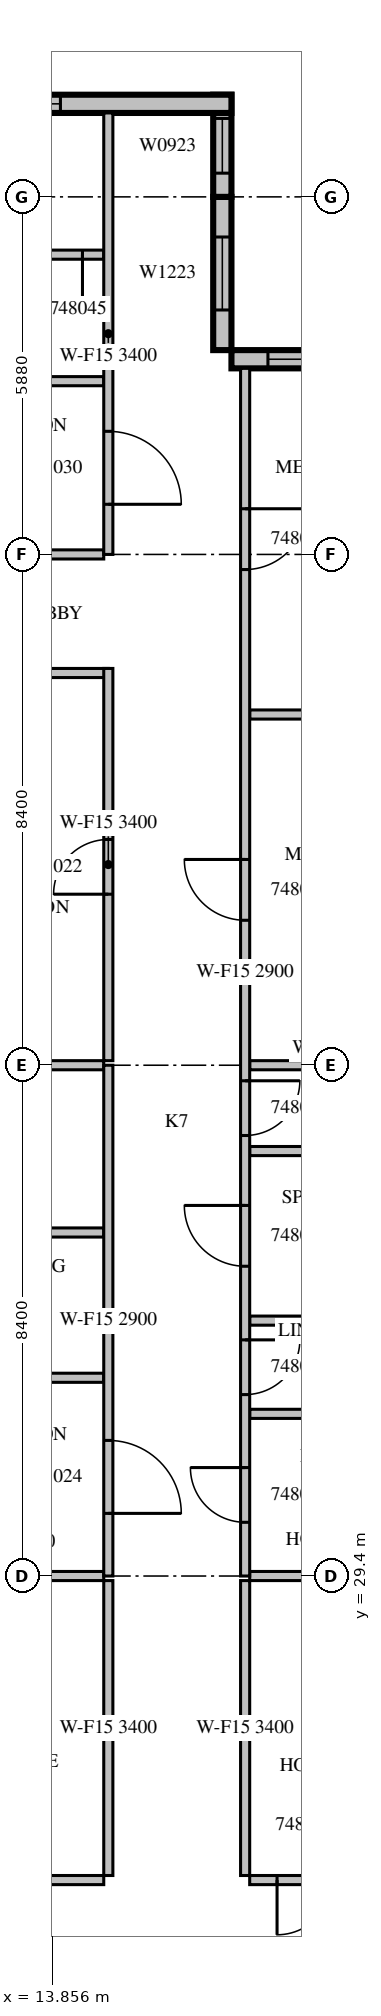
"""IFC4 building model, lengths in metres.
Left out: names, types, materials, properties, quantities, classifications, styles, units other than length and angle.
Written with IfcOpenShell. Run it as: python <this file> out.ifc"""

import sys

from ifc_helpers import new_model, si_unit, direction, frame, frame_2d, origin, place, context, subcontext, project, spatial, rectangle, extrude, source, transform, mapped, element, fill, save


model = new_model("IFC4")
c1 = context("Model", 3, precision=1e-05, world=origin(), true_north=direction((0.0, 1.0)))
c2 = subcontext(c1, "Body", "Model", "MODEL_VIEW")
j1 = project(units=[si_unit("LENGTHUNIT", "METRE"), si_unit("PLANEANGLEUNIT", "RADIAN")], contexts=[c1])
p1 = place(None, origin())
s1 = spatial("IfcSite", under=j1, at=p1, CompositionType="ELEMENT")
p2 = place(p1, origin())
s2 = spatial("IfcBuilding", under=s1, at=p2, CompositionType="ELEMENT")
p3 = place(p2, frame((0.0, 0.0, 215.8)))
s3 = spatial("IfcBuildingStorey", under=s2, at=p3, CompositionType="ELEMENT", Elevation=215.8)
m1 = source(origin(), c2, "Body", "SweptSolid", [
    extrude(rectangle(XDim=4.2, YDim=0.3, at=frame_2d((2.1, 0.0))), origin(), (0.0, 0.0, 1.0), 3.4),
])
p4 = place(p3, frame((21.0, 49.41, 0.0), z_axis=(0.0, 0.0, 1.0), x_axis=(-1.0, 0.0, 0.0)))
e1 = element("IfcWall", 1, at=p4, inside=s3, PredefinedType="STANDARD", context=c2, shape_type="MappedRepresentation", body=[
    mapped(m1, transform((0.0, 0.0, 0.0), scale=1.0)),
])
m2 = source(origin(), c2, "Body", "SweptSolid", [
    extrude(rectangle(XDim=3.0, YDim=2.3, at=frame_2d((1.5, 1.15))), frame((0.0, 0.16, 0.0), z_axis=(0.0, -1.0, 0.0), x_axis=(1.0, 0.0, 0.0)), (0.0, 0.0, 1.0), 0.32),
])
p5 = place(p4, frame((0.6, 0.0, 0.6)))
e2 = element("IfcOpeningElement", 2, at=p5, cuts=e1, PredefinedType="OPENING", context=c2, shape_type="MappedRepresentation", body=[
    mapped(m2, transform((0.0, 0.0, 0.0), scale=1.0)),
])
m3 = source(origin(), c2, "Body", "SweptSolid", [
    extrude(rectangle(XDim=2.52, YDim=0.3, at=frame_2d((1.26, 0.0))), origin(), (0.0, 0.0, 1.0), 3.4),
])
p6 = place(p3, frame((16.65, 49.56, 0.0), z_axis=(0.0, 0.0, 1.0), x_axis=(0.0, 1.0, 0.0)))
e3 = element("IfcWall", 3, at=p6, inside=s3, PredefinedType="STANDARD", context=c2, shape_type="MappedRepresentation", body=[
    mapped(m3, transform((0.0, 0.0, 0.0), scale=1.0)),
])
m4 = source(origin(), c2, "Body", "SweptSolid", [
    extrude(rectangle(XDim=1.2, YDim=2.3, at=frame_2d((0.6, 1.15))), frame((0.0, 0.16, 0.0), z_axis=(0.0, -1.0, 0.0), x_axis=(1.0, 0.0, 0.0)), (0.0, 0.0, 1.0), 0.32),
])
p7 = place(p6, frame((0.66, 0.0, 0.6)))
e4 = element("IfcOpeningElement", 4, at=p7, cuts=e3, PredefinedType="OPENING", context=c2, shape_type="MappedRepresentation", body=[
    mapped(m4, transform((0.0, 0.0, 0.0), scale=1.0)),
])
m5 = source(origin(), c2, "Body", "SweptSolid", [
    extrude(rectangle(XDim=1.68, YDim=0.3, at=frame_2d((0.84, 0.0))), origin(), (0.0, 0.0, 1.0), 3.4),
])
p8 = place(p3, frame((16.65, 52.08, 0.0), z_axis=(0.0, 0.0, 1.0), x_axis=(0.0, 1.0, 0.0)))
e5 = element("IfcWall", 5, at=p8, inside=s3, PredefinedType="STANDARD", context=c2, shape_type="MappedRepresentation", body=[
    mapped(m5, transform((0.0, 0.0, 0.0), scale=1.0)),
])
m6 = source(origin(), c2, "Body", "SweptSolid", [
    extrude(rectangle(XDim=0.9, YDim=2.3, at=frame_2d((0.45, 1.15))), frame((0.0, 0.16, 0.0), z_axis=(0.0, -1.0, 0.0), x_axis=(1.0, 0.0, 0.0)), (0.0, 0.0, 1.0), 0.32),
])
p9 = place(p8, frame((0.39, 0.0, 0.6)))
e6 = element("IfcOpeningElement", 6, at=p9, cuts=e5, PredefinedType="OPENING", context=c2, shape_type="MappedRepresentation", body=[
    mapped(m6, transform((0.0, 0.0, 0.0), scale=1.0)),
])
m7 = source(origin(), c2, "Body", "SweptSolid", [
    extrude(rectangle(XDim=10.5, YDim=0.3, at=frame_2d((5.25, 0.0))), origin(), (0.0, 0.0, 1.0), 3.4),
])
p10 = place(p3, frame((16.8, 53.61, 0.0), z_axis=(0.0, 0.0, 1.0), x_axis=(-1.0, 0.0, 0.0)))
e7 = element("IfcWall", 7, at=p10, inside=s3, PredefinedType="STANDARD", context=c2, shape_type="MappedRepresentation", body=[
    mapped(m7, transform((0.0, 0.0, 0.0), scale=1.0)),
])
m8 = source(origin(), c2, "Body", "SweptSolid", [
    extrude(rectangle(XDim=1.8, YDim=2.3, at=frame_2d((0.9, 1.15))), frame((0.0, 0.16, 0.0), z_axis=(0.0, -1.0, 0.0), x_axis=(1.0, 0.0, 0.0)), (0.0, 0.0, 1.0), 0.32),
])
p11 = place(p10, frame((8.025, 0.0, 0.6)))
e8 = element("IfcOpeningElement", 8, at=p11, cuts=e7, PredefinedType="OPENING", context=c2, shape_type="MappedRepresentation", body=[
    mapped(m8, transform((0.0, 0.0, 0.0), scale=1.0)),
])
m9 = source(origin(), c2, "Body", "SweptSolid", [
    extrude(rectangle(XDim=2.4, YDim=2.3, at=frame_2d((1.2, 1.15))), frame((0.0, 0.16, 0.0), z_axis=(0.0, -1.0, 0.0), x_axis=(1.0, 0.0, 0.0)), (0.0, 0.0, 1.0), 0.32),
])
p12 = place(p10, frame((2.812, 0.0, 0.6)))
e9 = element("IfcOpeningElement", 9, at=p12, cuts=e7, PredefinedType="OPENING", context=c2, shape_type="MappedRepresentation", body=[
    mapped(m9, transform((0.0, 0.0, 0.0), scale=1.0)),
])
m10 = source(origin(), c2, "Body", "SweptSolid", [
    extrude(rectangle(XDim=8.195, YDim=0.15, at=frame_2d((4.098, 0.0))), origin(), (0.0, 0.0, 1.0), 3.4),
])
p13 = place(p3, frame((6.505, 24.4, 0.0), z_axis=(0.0, 0.0, 1.0), x_axis=(1.0, 0.0, 0.0)))
e10 = element("IfcWall", 10, at=p13, inside=s3, PredefinedType="PARTITIONING", context=c2, shape_type="MappedRepresentation", body=[
    mapped(m10, transform((0.0, 0.0, 0.0), scale=1.0)),
])
m11 = source(origin(), c2, "Body", "SweptSolid", [
    extrude(rectangle(XDim=0.9, YDim=2.1, at=frame_2d((0.45, 1.05))), frame((0.0, 0.085, 0.0), z_axis=(0.0, -1.0, 0.0), x_axis=(1.0, 0.0, 0.0)), (0.0, 0.0, 1.0), 0.17),
])
p14 = place(p13, frame((1.395, 0.0, 0.0)))
e11 = element("IfcOpeningElement", 11, at=p14, cuts=e10, PredefinedType="OPENING", context=c2, shape_type="MappedRepresentation", body=[
    mapped(m11, transform((0.0, 0.0, 0.0), scale=1.0)),
])
p15 = place(p13, frame((6.32, 0.0, 0.0)))
e12 = element("IfcOpeningElement", 12, at=p15, cuts=e10, PredefinedType="OPENING", context=c2, shape_type="MappedRepresentation", body=[
    mapped(m11, transform((0.0, 0.0, 0.0), scale=1.0)),
])
m12 = source(origin(), c2, "Body", "SweptSolid", [
    extrude(rectangle(XDim=3.6, YDim=0.15, at=frame_2d((1.8, 0.0))), origin(), (0.0, 0.0, 1.0), 3.4),
])
p16 = place(p3, frame((17.1, 24.4, 0.0), z_axis=(0.0, 0.0, 1.0), x_axis=(1.0, 0.0, 0.0)))
e13 = element("IfcWall", 13, at=p16, inside=s3, PredefinedType="PARTITIONING", context=c2, shape_type="MappedRepresentation", body=[
    mapped(m12, transform((0.0, 0.0, 0.0), scale=1.0)),
])
p17 = place(p16, frame((0.45, 0.0, 0.0)))
e14 = element("IfcOpeningElement", 14, at=p17, cuts=e13, PredefinedType="OPENING", context=c2, shape_type="MappedRepresentation", body=[
    mapped(m11, transform((0.0, 0.0, 0.0), scale=1.0)),
])
m13 = source(origin(), c2, "Body", "SweptSolid", [
    extrude(rectangle(XDim=4.85, YDim=0.15, at=frame_2d((2.425, 0.0))), origin(), (0.0, 0.0, 1.0), 3.4),
])
for number, where, z_axis, x_axis in (
    (15, (14.775, 24.475, 0.0), (0.0, 0.0, 1.0), (0.0, 1.0, 0.0)),
    (16, (17.025, 29.325, 0.0), (0.0, 0.0, 1.0), (0.0, -1.0, 0.0)),
):
    element("IfcWall", number, at=place(p3, frame(where, z_axis=z_axis, x_axis=x_axis)), inside=s3, PredefinedType="PARTITIONING", context=c2, shape_type="MappedRepresentation", body=[
        mapped(m13, transform((0.0, 0.0, 0.0), scale=1.0)),
    ])
m14 = source(origin(), c2, "Body", "SweptSolid", [
    extrude(rectangle(XDim=3.751, YDim=0.15, at=frame_2d((1.875, 0.0))), origin(), (0.0, 0.0, 1.0), 3.4),
])
p18 = place(p3, frame((14.7, 29.4, 0.0), z_axis=(0.0, 0.0, 1.0), x_axis=(-1.0, 0.0, 0.0)))
e17 = element("IfcWall", 17, at=p18, inside=s3, PredefinedType="PARTITIONING", context=c2, shape_type="MappedRepresentation", body=[
    mapped(m14, transform((0.0, 0.0, 0.0), scale=1.0)),
])
m15 = source(origin(), c2, "Body", "SweptSolid", [
    extrude(rectangle(XDim=3.001, YDim=0.15, at=frame_2d((1.5, 0.0))), origin(), (0.0, 0.0, 1.0), 3.4),
])
p19 = place(p3, frame((20.101, 29.4, 0.0), z_axis=(0.0, 0.0, 1.0), x_axis=(-1.0, 0.0, 0.0)))
e18 = element("IfcWall", 18, at=p19, inside=s3, PredefinedType="PARTITIONING", context=c2, shape_type="MappedRepresentation", body=[
    mapped(m15, transform((0.0, 0.0, 0.0), scale=1.0)),
])
m16 = source(origin(), c2, "Body", "SweptSolid", [
    extrude(rectangle(XDim=2.875, YDim=0.15, at=frame_2d((1.438, 0.0))), origin(), (0.0, 0.0, 1.0), 3.4),
])
p20 = place(p3, frame((14.775, 44.25, 0.0), z_axis=(0.0, 0.0, 1.0), x_axis=(-1.0, 0.0, 0.0)))
e19 = element("IfcWall", 19, at=p20, inside=s3, PredefinedType="PARTITIONING", context=c2, shape_type="MappedRepresentation", body=[
    mapped(m16, transform((0.0, 0.0, 0.0), scale=1.0)),
])
m17 = source(origin(), c2, "Body", "SweptSolid", [
    extrude(rectangle(XDim=6.45, YDim=0.15, at=frame_2d((3.225, 0.0))), origin(), (0.0, 0.0, 1.0), 3.4),
])
p21 = place(p3, frame((14.775, 37.875, 0.0), z_axis=(0.0, 0.0, 1.0), x_axis=(0.0, 1.0, 0.0)))
e20 = element("IfcWall", 20, at=p21, inside=s3, PredefinedType="PARTITIONING", context=c2, shape_type="MappedRepresentation", body=[
    mapped(m17, transform((0.0, 0.0, 0.0), scale=1.0)),
])
p22 = place(p21, frame((2.737, 0.0, 0.0)))
e21 = element("IfcOpeningElement", 21, at=p22, cuts=e20, PredefinedType="OPENING", context=c2, shape_type="MappedRepresentation", body=[
    mapped(m11, transform((0.0, 0.0, 0.0), scale=1.0)),
])
for number, where, z_axis, x_axis in (
    (22, (14.7, 32.66, 0.0), (0.0, 0.0, 1.0), (-1.0, 0.0, 0.0)),
    (23, (14.7, 35.049, 0.0), (0.0, 0.0, 1.0), (-1.0, 0.0, 0.0)),
    (24, (14.7, 37.8, 0.0), (0.0, 0.0, 1.0), (-1.0, 0.0, 0.0)),
    (25, (14.7, 49.049, 0.0), (0.0, 0.0, 1.0), (-1.0, 0.0, 0.0)),
):
    element("IfcWall", number, at=place(p3, frame(where, z_axis=z_axis, x_axis=x_axis)), inside=s3, PredefinedType="PARTITIONING", context=c2, shape_type="MappedRepresentation", body=[
        mapped(m12, transform((0.0, 0.0, 0.0), scale=1.0)),
    ])
p23 = place(p3, frame((14.7, 51.13, 0.0), z_axis=(0.0, 0.0, 1.0), x_axis=(-1.0, 0.0, 0.0)))
e26 = element("IfcWall", 26, at=p23, inside=s3, PredefinedType="PARTITIONING", context=c2, shape_type="MappedRepresentation", body=[
    mapped(m12, transform((0.0, 0.0, 0.0), scale=1.0)),
])
p24 = place(p23, frame((1.35, 0.0, 0.0)))
e27 = element("IfcOpeningElement", 27, at=p24, cuts=e26, PredefinedType="OPENING", context=c2, shape_type="MappedRepresentation", body=[
    mapped(m11, transform((0.0, 0.0, 0.0), scale=1.0)),
])
p25 = place(p23, frame((0.35, 0.0, 0.0)))
e28 = element("IfcOpeningElement", 28, at=p25, cuts=e26, PredefinedType="OPENING", context=c2, shape_type="MappedRepresentation", body=[
    mapped(m11, transform((0.0, 0.0, 0.0), scale=1.0)),
])
p26 = place(p23, frame((2.35, 0.0, 0.0)))
e29 = element("IfcOpeningElement", 29, at=p26, cuts=e26, PredefinedType="OPENING", context=c2, shape_type="MappedRepresentation", body=[
    mapped(m11, transform((0.0, 0.0, 0.0), scale=1.0)),
])
p27 = place(p3, frame((14.7, 46.2, 0.0), z_axis=(0.0, 0.0, 1.0), x_axis=(-1.0, 0.0, 0.0)))
e30 = element("IfcWall", 30, at=p27, inside=s3, PredefinedType="PARTITIONING", context=c2, shape_type="MappedRepresentation", body=[
    mapped(m12, transform((0.0, 0.0, 0.0), scale=1.0)),
])
m18 = source(origin(), c2, "Body", "SweptSolid", [
    extrude(rectangle(XDim=3.6, YDim=0.15, at=frame_2d((1.8, 0.0))), origin(), (0.0, 0.0, 1.0), 2.4),
])
for number, where, z_axis, x_axis in (
    (31, (17.1, 32.067, 0.0), (0.0, 0.0, 1.0), (1.0, 0.0, 0.0)),
    (32, (17.1, 36.389, 0.0), (0.0, 0.0, 1.0), (1.0, 0.0, 0.0)),
):
    element("IfcWall", number, at=place(p3, frame(where, z_axis=z_axis, x_axis=x_axis)), inside=s3, PredefinedType="PARTITIONING", context=c2, shape_type="MappedRepresentation", body=[
        mapped(m18, transform((0.0, 0.0, 0.0), scale=1.0)),
    ])
p28 = place(p3, frame((17.1, 43.568, 0.0), z_axis=(0.0, 0.0, 1.0), x_axis=(1.0, 0.0, 0.0)))
e33 = element("IfcWall", 33, at=p28, inside=s3, PredefinedType="PARTITIONING", context=c2, shape_type="MappedRepresentation", body=[
    mapped(m12, transform((0.0, 0.0, 0.0), scale=1.0)),
])
p29 = place(p3, frame((20.7, 33.6, 0.0), z_axis=(0.0, 0.0, 1.0), x_axis=(-1.0, 0.0, 0.0)))
e34 = element("IfcWall", 34, at=p29, inside=s3, PredefinedType="PARTITIONING", context=c2, shape_type="MappedRepresentation", body=[
    mapped(m18, transform((0.0, 0.0, 0.0), scale=1.0)),
])
p30 = place(p3, frame((20.101, 37.8, 0.0), z_axis=(0.0, 0.0, 1.0), x_axis=(-1.0, 0.0, 0.0)))
e35 = element("IfcWall", 35, at=p30, inside=s3, PredefinedType="PARTITIONING", context=c2, shape_type="MappedRepresentation", body=[
    mapped(m15, transform((0.0, 0.0, 0.0), scale=1.0)),
])
m19 = source(origin(), c2, "Body", "SweptSolid", [
    extrude(rectangle(XDim=8.4, YDim=0.15, at=frame_2d((4.2, 0.0))), origin(), (0.0, 0.0, 1.0), 2.9),
])
p31 = place(p3, frame((14.775, 29.4, 0.0), z_axis=(0.0, 0.0, 1.0), x_axis=(0.0, 1.0, 0.0)))
e36 = element("IfcWall", 36, at=p31, inside=s3, PredefinedType="PARTITIONING", context=c2, shape_type="MappedRepresentation", body=[
    mapped(m19, transform((0.0, 0.0, 0.0), scale=1.0)),
])
m20 = source(origin(), c2, "Body", "SweptSolid", [
    extrude(rectangle(XDim=1.2, YDim=2.1, at=frame_2d((0.6, 1.05))), frame((0.0, 0.085, 0.0), z_axis=(0.0, -1.0, 0.0), x_axis=(1.0, 0.0, 0.0)), (0.0, 0.0, 1.0), 0.17),
])
p32 = place(p31, frame((1.03, 0.0, 0.0)))
e37 = element("IfcOpeningElement", 37, at=p32, cuts=e36, PredefinedType="OPENING", context=c2, shape_type="MappedRepresentation", body=[
    mapped(m20, transform((0.0, 0.0, 0.0), scale=1.0)),
])
m21 = source(origin(), c2, "Body", "SweptSolid", [
    extrude(rectangle(XDim=7.26, YDim=0.15, at=frame_2d((3.63, 0.0))), origin(), (0.0, 0.0, 1.0), 3.4),
])
p33 = place(p3, frame((14.775, 46.2, 0.0), z_axis=(0.0, 0.0, 1.0), x_axis=(0.0, 1.0, 0.0)))
e38 = element("IfcWall", 38, at=p33, inside=s3, PredefinedType="PARTITIONING", context=c2, shape_type="MappedRepresentation", body=[
    mapped(m21, transform((0.0, 0.0, 0.0), scale=1.0)),
])
p34 = place(p33, frame((0.825, 0.0, 0.0)))
e39 = element("IfcOpeningElement", 39, at=p34, cuts=e38, PredefinedType="OPENING", context=c2, shape_type="MappedRepresentation", body=[
    mapped(m20, transform((0.0, 0.0, 0.0), scale=1.0)),
])
m22 = source(origin(), c2, "Body", "SweptSolid", [
    extrude(rectangle(XDim=19.86, YDim=0.15, at=frame_2d((9.93, 0.0))), origin(), (0.0, 0.0, 1.0), 2.9),
])
p35 = place(p3, frame((17.025, 49.26, 0.0), z_axis=(0.0, 0.0, 1.0), x_axis=(0.0, -1.0, 0.0)))
e40 = element("IfcWall", 40, at=p35, inside=s3, PredefinedType="PARTITIONING", context=c2, shape_type="MappedRepresentation", body=[
    mapped(m22, transform((0.0, 0.0, 0.0), scale=1.0)),
])
p36 = place(p35, frame((18.076, 0.0, 0.0)))
e41 = element("IfcOpeningElement", 41, at=p36, cuts=e40, PredefinedType="OPENING", context=c2, shape_type="MappedRepresentation", body=[
    mapped(m11, transform((0.0, 0.0, 0.0), scale=1.0)),
])
p37 = place(p35, frame((15.976, 0.0, 0.0)))
e42 = element("IfcOpeningElement", 42, at=p37, cuts=e40, PredefinedType="OPENING", context=c2, shape_type="MappedRepresentation", body=[
    mapped(m11, transform((0.0, 0.0, 0.0), scale=1.0)),
])
m23 = source(origin(), c2, "Body", "SweptSolid", [
    extrude(rectangle(XDim=1.0, YDim=2.1, at=frame_2d((0.5, 1.05))), frame((0.0, 0.085, 0.0), z_axis=(0.0, -1.0, 0.0), x_axis=(1.0, 0.0, 0.0)), (0.0, 0.0, 1.0), 0.17),
])
p38 = place(p35, frame((13.766, 0.0, 0.0)))
e43 = element("IfcOpeningElement", 43, at=p38, cuts=e40, PredefinedType="OPENING", context=c2, shape_type="MappedRepresentation", body=[
    mapped(m23, transform((0.0, 0.0, 0.0), scale=1.0)),
])
p39 = place(p35, frame((11.716, 0.0, 0.0)))
e44 = element("IfcOpeningElement", 44, at=p39, cuts=e40, PredefinedType="OPENING", context=c2, shape_type="MappedRepresentation", body=[
    mapped(m11, transform((0.0, 0.0, 0.0), scale=1.0)),
])
p40 = place(p35, frame((8.076, 0.0, 0.0)))
e45 = element("IfcOpeningElement", 45, at=p40, cuts=e40, PredefinedType="OPENING", context=c2, shape_type="MappedRepresentation", body=[
    mapped(m23, transform((0.0, 0.0, 0.0), scale=1.0)),
])
p41 = place(p35, frame((2.309, 0.0, 0.0)))
e46 = element("IfcOpeningElement", 46, at=p41, cuts=e40, PredefinedType="OPENING", context=c2, shape_type="MappedRepresentation", body=[
    mapped(m23, transform((0.0, 0.0, 0.0), scale=1.0)),
])
m24 = source(origin(), c2, "Body", "SweptSolid", [
    extrude(rectangle(XDim=3.0, YDim=2.3, at=frame_2d((1.5, 1.15))), frame((0.0, 0.03, 0.0), z_axis=(0.0, -1.0, 0.0), x_axis=(1.0, 0.0, 0.0)), (0.0, 0.0, 1.0), 0.06),
])
p42 = place(p5, origin())
e47 = element("IfcWindow", 47, at=p42, inside=s3, PartitioningType="SINGLE_PANEL", PredefinedType="WINDOW", context=c2, shape_type="MappedRepresentation", body=[
    mapped(m24, transform((0.0, 0.0, 0.0), scale=1.0)),
])
fill(e2, e47)
m25 = source(origin(), c2, "Body", "SweptSolid", [
    extrude(rectangle(XDim=1.2, YDim=2.3, at=frame_2d((0.6, 1.15))), frame((0.0, 0.03, 0.0), z_axis=(0.0, -1.0, 0.0), x_axis=(1.0, 0.0, 0.0)), (0.0, 0.0, 1.0), 0.06),
])
p43 = place(p7, origin())
e48 = element("IfcWindow", 48, at=p43, inside=s3, PartitioningType="SINGLE_PANEL", PredefinedType="WINDOW", context=c2, shape_type="MappedRepresentation", body=[
    mapped(m25, transform((0.0, 0.0, 0.0), scale=1.0)),
])
fill(e4, e48)
m26 = source(origin(), c2, "Body", "SweptSolid", [
    extrude(rectangle(XDim=0.9, YDim=2.3, at=frame_2d((0.45, 1.15))), frame((0.0, 0.03, 0.0), z_axis=(0.0, -1.0, 0.0), x_axis=(1.0, 0.0, 0.0)), (0.0, 0.0, 1.0), 0.06),
])
p44 = place(p9, origin())
e49 = element("IfcWindow", 49, at=p44, inside=s3, PartitioningType="SINGLE_PANEL", PredefinedType="WINDOW", context=c2, shape_type="MappedRepresentation", body=[
    mapped(m26, transform((0.0, 0.0, 0.0), scale=1.0)),
])
fill(e6, e49)
m27 = source(origin(), c2, "Body", "SweptSolid", [
    extrude(rectangle(XDim=2.4, YDim=2.3, at=frame_2d((1.2, 1.15))), frame((0.0, 0.03, 0.0), z_axis=(0.0, -1.0, 0.0), x_axis=(1.0, 0.0, 0.0)), (0.0, 0.0, 1.0), 0.06),
])
p45 = place(p12, origin())
e50 = element("IfcWindow", 50, at=p45, inside=s3, PartitioningType="SINGLE_PANEL", PredefinedType="WINDOW", context=c2, shape_type="MappedRepresentation", body=[
    mapped(m27, transform((0.0, 0.0, 0.0), scale=1.0)),
])
fill(e9, e50)
m28 = source(origin(), c2, "Body", "SweptSolid", [
    extrude(rectangle(XDim=0.9, YDim=2.1, at=frame_2d((0.45, 1.05))), frame((0.0, 0.025, 0.0), z_axis=(0.0, -1.0, 0.0), x_axis=(1.0, 0.0, 0.0)), (0.0, 0.0, 1.0), 0.05),
])
p46 = place(p17, origin())
e51 = element("IfcDoor", 51, at=p46, inside=s3, OperationType="SINGLE_SWING_RIGHT", PredefinedType="DOOR", context=c2, shape_type="MappedRepresentation", body=[
    mapped(m28, transform((0.0, 0.0, 0.0), scale=1.0)),
])
fill(e14, e51)
p47 = place(p22, origin())
e52 = element("IfcDoor", 52, at=p47, inside=s3, OperationType="SINGLE_SWING_LEFT", PredefinedType="DOOR", context=c2, shape_type="MappedRepresentation", body=[
    mapped(m28, transform((0.0, 0.0, 0.0), scale=1.0)),
])
fill(e21, e52)
m29 = source(origin(), c2, "Body", "SweptSolid", [
    extrude(rectangle(XDim=1.2, YDim=2.1, at=frame_2d((0.6, 1.05))), frame((0.0, 0.025, 0.0), z_axis=(0.0, -1.0, 0.0), x_axis=(1.0, 0.0, 0.0)), (0.0, 0.0, 1.0), 0.05),
])
p48 = place(p32, origin())
e53 = element("IfcDoor", 53, at=p48, inside=s3, OperationType="SINGLE_SWING_RIGHT", PredefinedType="DOOR", context=c2, shape_type="MappedRepresentation", body=[
    mapped(m29, transform((0.0, 0.0, 0.0), scale=1.0)),
])
fill(e37, e53)
p49 = place(p34, origin())
e54 = element("IfcDoor", 54, at=p49, inside=s3, OperationType="SINGLE_SWING_RIGHT", PredefinedType="DOOR", context=c2, shape_type="MappedRepresentation", body=[
    mapped(m29, transform((0.0, 0.0, 0.0), scale=1.0)),
])
fill(e39, e54)
p50 = place(p36, origin())
e55 = element("IfcDoor", 55, at=p50, inside=s3, OperationType="SINGLE_SWING_RIGHT", PredefinedType="DOOR", context=c2, shape_type="MappedRepresentation", body=[
    mapped(m28, transform((0.0, 0.0, 0.0), scale=1.0)),
])
fill(e41, e55)
p51 = place(p37, origin())
e56 = element("IfcDoor", 56, at=p51, inside=s3, OperationType="SINGLE_SWING_LEFT", PredefinedType="DOOR", context=c2, shape_type="MappedRepresentation", body=[
    mapped(m28, transform((0.0, 0.0, 0.0), scale=1.0)),
])
fill(e42, e56)
m30 = source(origin(), c2, "Body", "SweptSolid", [
    extrude(rectangle(XDim=1.0, YDim=2.1, at=frame_2d((0.5, 1.05))), frame((0.0, 0.025, 0.0), z_axis=(0.0, -1.0, 0.0), x_axis=(1.0, 0.0, 0.0)), (0.0, 0.0, 1.0), 0.05),
])
p52 = place(p38, origin())
e57 = element("IfcDoor", 57, at=p52, inside=s3, OperationType="SINGLE_SWING_RIGHT", PredefinedType="DOOR", context=c2, shape_type="MappedRepresentation", body=[
    mapped(m30, transform((0.0, 0.0, 0.0), scale=1.0)),
])
fill(e43, e57)
p53 = place(p39, origin())
e58 = element("IfcDoor", 58, at=p53, inside=s3, OperationType="SINGLE_SWING_LEFT", PredefinedType="DOOR", context=c2, shape_type="MappedRepresentation", body=[
    mapped(m28, transform((0.0, 0.0, 0.0), scale=1.0)),
])
fill(e44, e58)
p54 = place(p40, origin())
e59 = element("IfcDoor", 59, at=p54, inside=s3, OperationType="SINGLE_SWING_RIGHT", PredefinedType="DOOR", context=c2, shape_type="MappedRepresentation", body=[
    mapped(m30, transform((0.0, 0.0, 0.0), scale=1.0)),
])
fill(e45, e59)
p55 = place(p41, origin())
e60 = element("IfcDoor", 60, at=p55, inside=s3, OperationType="SINGLE_SWING_LEFT", PredefinedType="DOOR", context=c2, shape_type="MappedRepresentation", body=[
    mapped(m30, transform((0.0, 0.0, 0.0), scale=1.0)),
])
fill(e46, e60)
p56 = place(p25, origin())
e61 = element("IfcDoor", 61, at=p56, inside=s3, OperationType="SINGLE_SWING_LEFT", PredefinedType="DOOR", context=c2, shape_type="MappedRepresentation", body=[
    mapped(m28, transform((0.0, 0.0, 0.0), scale=1.0)),
])
fill(e28, e61)
save(model, sys.argv[1])
